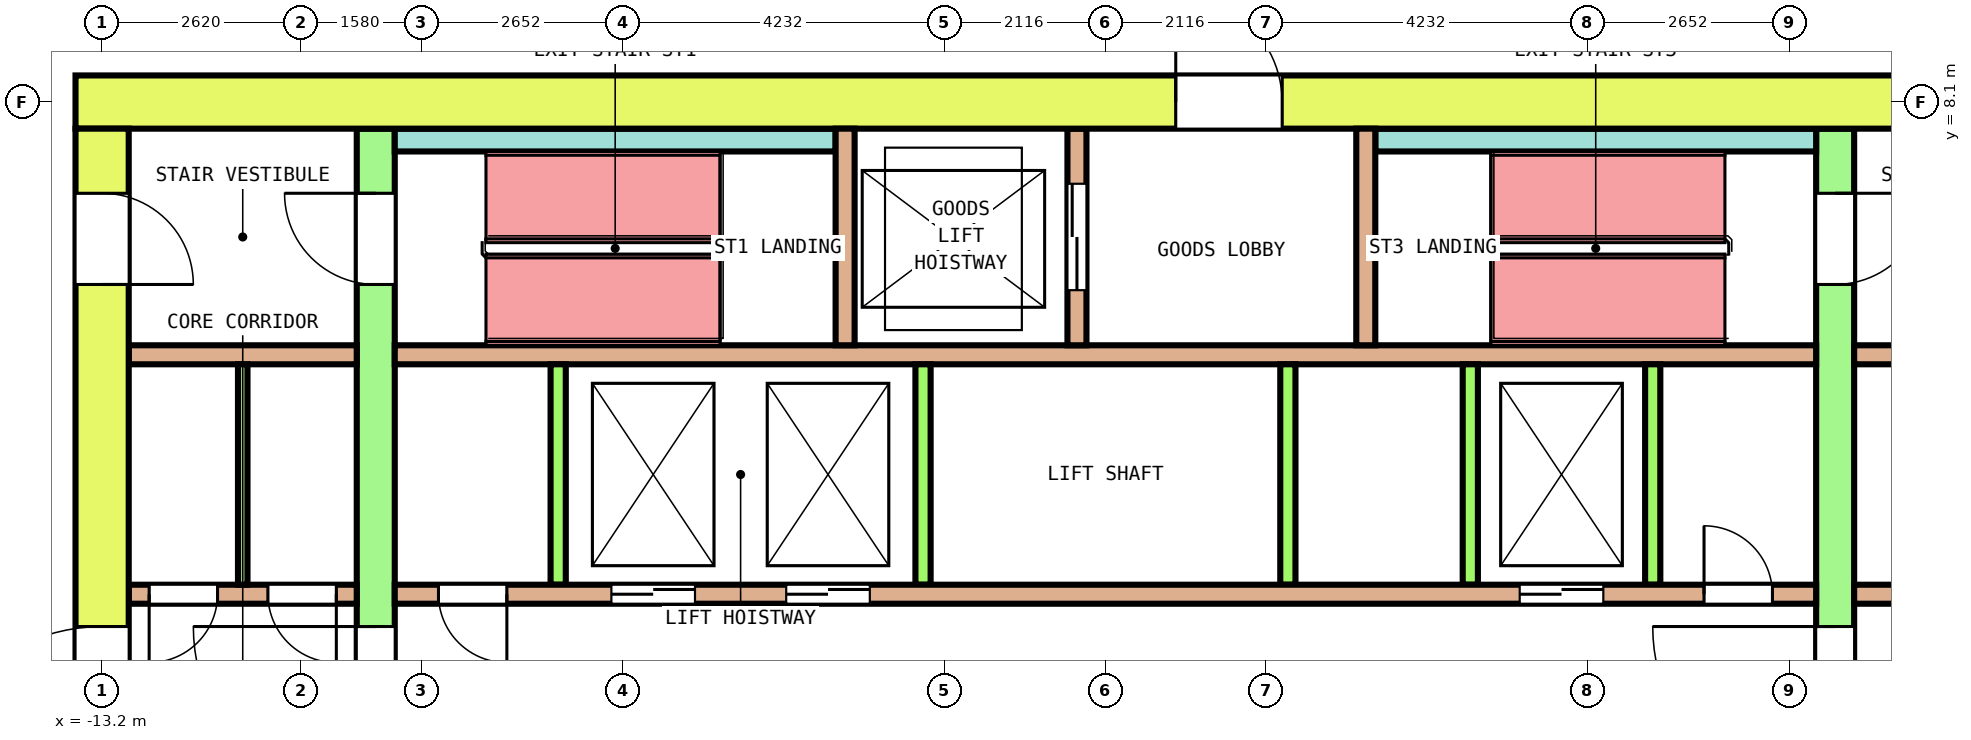
"""IFC4 building model, lengths in metres.
Left out: names, types, materials, properties, quantities, classifications, styles, units other than length and angle.
Written with IfcOpenShell. Run it as: python <this file> out.ifc"""

import sys

from ifc_helpers import new_model, si_unit, direction, frame, frame_2d, origin, place, context, subcontext, project, spatial, rectangle, extrude, element, fill, save


model = new_model("IFC4")
c1 = context("Model", 3, precision=1e-05, world=origin(), true_north=direction((0.0, 1.0)))
c2 = subcontext(c1, "Body", "Model", "MODEL_VIEW")
j1 = project(units=[si_unit("LENGTHUNIT", "METRE"), si_unit("PLANEANGLEUNIT", "RADIAN")], contexts=[c1])
p1 = place(None, origin())
s1 = spatial("IfcSite", under=j1, at=p1, CompositionType="ELEMENT")
p2 = place(p1, origin())
s2 = spatial("IfcBuilding", under=s1, at=p2, CompositionType="ELEMENT")
p3 = place(p2, frame((0.0, 0.0, 149.6)))
s3 = spatial("IfcBuildingStorey", under=s2, at=p3, CompositionType="ELEMENT", Elevation=149.6)
p4 = place(p3, frame((-13.55, 8.1, 0.0), z_axis=(0.0, 0.0, 1.0), x_axis=(1.0, 0.0, 0.0)))
e1 = element("IfcWall", 1, at=p4, inside=s3, PredefinedType="SHEAR", context=c2, shape_type="SweptSolid", body=[
    extrude(rectangle(XDim=27.1, YDim=0.7, at=frame_2d((13.55, 0.0))), origin(), (0.0, 0.0, 1.0), 4.1),
])
p5 = place(p4, frame((14.475, 0.0, 0.0)))
e2 = element("IfcOpeningElement", 2, at=p5, cuts=e1, PredefinedType="OPENING", context=c2, shape_type="SweptSolid", body=[
    extrude(rectangle(XDim=1.4, YDim=2.1, at=frame_2d((0.7, 1.05))), frame((0.0, 0.36, 0.0), z_axis=(0.0, -1.0, 0.0), x_axis=(1.0, 0.0, 0.0)), (0.0, 0.0, 1.0), 0.72),
])
p6 = place(p3, frame((-13.2, -7.75, 0.0), z_axis=(0.0, 0.0, 1.0), x_axis=(0.0, 1.0, 0.0)))
e3 = element("IfcWall", 3, at=p6, inside=s3, PredefinedType="SHEAR", context=c2, shape_type="SweptSolid", body=[
    extrude(rectangle(XDim=15.5, YDim=0.7, at=frame_2d((7.75, 0.0))), origin(), (0.0, 0.0, 1.0), 4.1),
])
p7 = place(p6, frame((6.55, 0.0, 0.0)))
e4 = element("IfcOpeningElement", 4, at=p7, cuts=e3, PredefinedType="OPENING", context=c2, shape_type="SweptSolid", body=[
    extrude(rectangle(XDim=2.4, YDim=2.1, at=frame_2d((1.2, 1.05))), frame((0.0, 0.36, 0.0), z_axis=(0.0, -1.0, 0.0), x_axis=(1.0, 0.0, 0.0)), (0.0, 0.0, 1.0), 0.72),
])
p8 = place(p6, frame((13.45, 0.0, 0.0)))
e5 = element("IfcOpeningElement", 5, at=p8, cuts=e3, PredefinedType="OPENING", context=c2, shape_type="SweptSolid", body=[
    extrude(rectangle(XDim=1.2, YDim=2.1, at=frame_2d((0.6, 1.05))), frame((0.0, 0.36, 0.0), z_axis=(0.0, -1.0, 0.0), x_axis=(1.0, 0.0, 0.0)), (0.0, 0.0, 1.0), 0.72),
])
p9 = place(p6, frame((0.85, 0.0, 0.0)))
e6 = element("IfcOpeningElement", 6, at=p9, cuts=e3, PredefinedType="OPENING", context=c2, shape_type="SweptSolid", body=[
    extrude(rectangle(XDim=1.2, YDim=2.1, at=frame_2d((0.6, 1.05))), frame((0.0, 0.36, 0.0), z_axis=(0.0, -1.0, 0.0), x_axis=(1.0, 0.0, 0.0)), (0.0, 0.0, 1.0), 0.72),
])
p10 = place(p3, frame((-9.6, -7.75, 0.0), z_axis=(0.0, 0.0, 1.0), x_axis=(0.0, 1.0, 0.0)))
e7 = element("IfcWall", 7, at=p10, inside=s3, PredefinedType="SHEAR", context=c2, shape_type="SweptSolid", body=[
    extrude(rectangle(XDim=15.5, YDim=0.5, at=frame_2d((7.75, 0.0))), origin(), (0.0, 0.0, 1.0), 4.1),
])
p11 = place(p10, frame((6.55, 0.0, 0.0)))
e8 = element("IfcOpeningElement", 8, at=p11, cuts=e7, PredefinedType="OPENING", context=c2, shape_type="SweptSolid", body=[
    extrude(rectangle(XDim=2.4, YDim=2.1, at=frame_2d((1.2, 1.05))), frame((0.0, 0.26, 0.0), z_axis=(0.0, -1.0, 0.0), x_axis=(1.0, 0.0, 0.0)), (0.0, 0.0, 1.0), 0.52),
])
p12 = place(p10, frame((13.45, 0.0, 0.0)))
e9 = element("IfcOpeningElement", 9, at=p12, cuts=e7, PredefinedType="OPENING", context=c2, shape_type="SweptSolid", body=[
    extrude(rectangle(XDim=1.2, YDim=2.1, at=frame_2d((0.6, 1.05))), frame((0.0, 0.26, 0.0), z_axis=(0.0, -1.0, 0.0), x_axis=(1.0, 0.0, 0.0)), (0.0, 0.0, 1.0), 0.52),
])
p13 = place(p10, frame((0.85, 0.0, 0.0)))
e10 = element("IfcOpeningElement", 10, at=p13, cuts=e7, PredefinedType="OPENING", context=c2, shape_type="SweptSolid", body=[
    extrude(rectangle(XDim=1.2, YDim=2.1, at=frame_2d((0.6, 1.05))), frame((0.0, 0.26, 0.0), z_axis=(0.0, -1.0, 0.0), x_axis=(1.0, 0.0, 0.0)), (0.0, 0.0, 1.0), 0.52),
])
p14 = place(p3, frame((9.6, -7.75, 0.0), z_axis=(0.0, 0.0, 1.0), x_axis=(0.0, 1.0, 0.0)))
e11 = element("IfcWall", 11, at=p14, inside=s3, PredefinedType="SHEAR", context=c2, shape_type="SweptSolid", body=[
    extrude(rectangle(XDim=15.5, YDim=0.5, at=frame_2d((7.75, 0.0))), origin(), (0.0, 0.0, 1.0), 4.1),
])
p15 = place(p14, frame((6.55, 0.0, 0.0)))
e12 = element("IfcOpeningElement", 12, at=p15, cuts=e11, PredefinedType="OPENING", context=c2, shape_type="SweptSolid", body=[
    extrude(rectangle(XDim=2.4, YDim=2.1, at=frame_2d((1.2, 1.05))), frame((0.0, 0.26, 0.0), z_axis=(0.0, -1.0, 0.0), x_axis=(1.0, 0.0, 0.0)), (0.0, 0.0, 1.0), 0.52),
])
p16 = place(p14, frame((13.45, 0.0, 0.0)))
e13 = element("IfcOpeningElement", 13, at=p16, cuts=e11, PredefinedType="OPENING", context=c2, shape_type="SweptSolid", body=[
    extrude(rectangle(XDim=1.2, YDim=2.1, at=frame_2d((0.6, 1.05))), frame((0.0, 0.26, 0.0), z_axis=(0.0, -1.0, 0.0), x_axis=(1.0, 0.0, 0.0)), (0.0, 0.0, 1.0), 0.52),
])
p17 = place(p14, frame((0.95, 0.0, 0.0)))
e14 = element("IfcOpeningElement", 14, at=p17, cuts=e11, PredefinedType="OPENING", context=c2, shape_type="SweptSolid", body=[
    extrude(rectangle(XDim=1.0, YDim=2.1, at=frame_2d((0.5, 1.05))), frame((0.0, 0.26, 0.0), z_axis=(0.0, -1.0, 0.0), x_axis=(1.0, 0.0, 0.0)), (0.0, 0.0, 1.0), 0.52),
])
p18 = place(p3, frame((-12.85, 1.625, 0.0), z_axis=(0.0, 0.0, 1.0), x_axis=(1.0, 0.0, 0.0)))
e15 = element("IfcWall", 15, at=p18, inside=s3, PredefinedType="SOLIDWALL", context=c2, shape_type="SweptSolid", body=[
    extrude(rectangle(XDim=3.0, YDim=0.25, at=frame_2d((1.5, 0.0))), origin(), (0.0, 0.0, 1.0), 4.1),
])
p19 = place(p18, frame((0.269, 0.0, 0.0)))
e16 = element("IfcOpeningElement", 16, at=p19, cuts=e15, PredefinedType="OPENING", context=c2, shape_type="SweptSolid", body=[
    extrude(rectangle(XDim=0.9, YDim=2.1, at=frame_2d((0.45, 1.05))), frame((0.0, 0.135, 0.0), z_axis=(0.0, -1.0, 0.0), x_axis=(1.0, 0.0, 0.0)), (0.0, 0.0, 1.0), 0.27),
])
p20 = place(p18, frame((1.831, 0.0, 0.0)))
e17 = element("IfcOpeningElement", 17, at=p20, cuts=e15, PredefinedType="OPENING", context=c2, shape_type="SweptSolid", body=[
    extrude(rectangle(XDim=0.9, YDim=2.1, at=frame_2d((0.45, 1.05))), frame((0.0, 0.135, 0.0), z_axis=(0.0, -1.0, 0.0), x_axis=(1.0, 0.0, 0.0)), (0.0, 0.0, 1.0), 0.27),
])
p21 = place(p3, frame((-9.35, 1.625, 0.0), z_axis=(0.0, 0.0, 1.0), x_axis=(1.0, 0.0, 0.0)))
e18 = element("IfcWall", 18, at=p21, inside=s3, PredefinedType="SOLIDWALL", context=c2, shape_type="SweptSolid", body=[
    extrude(rectangle(XDim=18.7, YDim=0.25, at=frame_2d((9.35, 0.0))), origin(), (0.0, 0.0, 1.0), 4.1),
])
p22 = place(p21, frame((2.85, 0.0, 0.0)))
e19 = element("IfcOpeningElement", 19, at=p22, cuts=e18, PredefinedType="OPENING", context=c2, shape_type="SweptSolid", body=[
    extrude(rectangle(XDim=1.1, YDim=2.1, at=frame_2d((0.55, 1.05))), frame((0.0, 0.135, 0.0), z_axis=(0.0, -1.0, 0.0), x_axis=(1.0, 0.0, 0.0)), (0.0, 0.0, 1.0), 0.27),
])
p23 = place(p21, frame((5.15, 0.0, 0.0)))
e20 = element("IfcOpeningElement", 20, at=p23, cuts=e18, PredefinedType="OPENING", context=c2, shape_type="SweptSolid", body=[
    extrude(rectangle(XDim=1.1, YDim=2.1, at=frame_2d((0.55, 1.05))), frame((0.0, 0.135, 0.0), z_axis=(0.0, -1.0, 0.0), x_axis=(1.0, 0.0, 0.0)), (0.0, 0.0, 1.0), 0.27),
])
p24 = place(p21, frame((14.8, 0.0, 0.0)))
e21 = element("IfcOpeningElement", 21, at=p24, cuts=e18, PredefinedType="OPENING", context=c2, shape_type="SweptSolid", body=[
    extrude(rectangle(XDim=1.1, YDim=2.1, at=frame_2d((0.55, 1.05))), frame((0.0, 0.135, 0.0), z_axis=(0.0, -1.0, 0.0), x_axis=(1.0, 0.0, 0.0)), (0.0, 0.0, 1.0), 0.27),
])
p25 = place(p21, frame((0.575, 0.0, 0.0)))
e22 = element("IfcOpeningElement", 22, at=p25, cuts=e18, PredefinedType="OPENING", context=c2, shape_type="SweptSolid", body=[
    extrude(rectangle(XDim=0.9, YDim=2.1, at=frame_2d((0.45, 1.05))), frame((0.0, 0.135, 0.0), z_axis=(0.0, -1.0, 0.0), x_axis=(1.0, 0.0, 0.0)), (0.0, 0.0, 1.0), 0.27),
])
p26 = place(p21, frame((17.225, 0.0, 0.0)))
e23 = element("IfcOpeningElement", 23, at=p26, cuts=e18, PredefinedType="OPENING", context=c2, shape_type="SweptSolid", body=[
    extrude(rectangle(XDim=0.9, YDim=2.1, at=frame_2d((0.45, 1.05))), frame((0.0, 0.135, 0.0), z_axis=(0.0, -1.0, 0.0), x_axis=(1.0, 0.0, 0.0)), (0.0, 0.0, 1.0), 0.27),
])
p27 = place(p3, frame((9.85, 1.625, 0.0), z_axis=(0.0, 0.0, 1.0), x_axis=(1.0, 0.0, 0.0)))
e24 = element("IfcWall", 24, at=p27, inside=s3, PredefinedType="SOLIDWALL", context=c2, shape_type="SweptSolid", body=[
    extrude(rectangle(XDim=3.0, YDim=0.25, at=frame_2d((1.5, 0.0))), origin(), (0.0, 0.0, 1.0), 4.1),
])
p28 = place(p27, frame((1.05, 0.0, 0.0)))
e25 = element("IfcOpeningElement", 25, at=p28, cuts=e24, PredefinedType="OPENING", context=c2, shape_type="SweptSolid", body=[
    extrude(rectangle(XDim=0.9, YDim=2.1, at=frame_2d((0.45, 1.05))), frame((0.0, 0.135, 0.0), z_axis=(0.0, -1.0, 0.0), x_axis=(1.0, 0.0, 0.0)), (0.0, 0.0, 1.0), 0.27),
])
p29 = place(p3, frame((-12.85, 4.775, 0.0), z_axis=(0.0, 0.0, 1.0), x_axis=(1.0, 0.0, 0.0)))
e26 = element("IfcWall", 26, at=p29, inside=s3, PredefinedType="SOLIDWALL", context=c2, shape_type="SweptSolid", body=[
    extrude(rectangle(XDim=3.0, YDim=0.25, at=frame_2d((1.5, 0.0))), origin(), (0.0, 0.0, 1.0), 4.1),
])
p30 = place(p3, frame((-9.35, 4.775, 0.0), z_axis=(0.0, 0.0, 1.0), x_axis=(1.0, 0.0, 0.0)))
e27 = element("IfcWall", 27, at=p30, inside=s3, PredefinedType="SOLIDWALL", context=c2, shape_type="SweptSolid", body=[
    extrude(rectangle(XDim=18.7, YDim=0.25, at=frame_2d((9.35, 0.0))), origin(), (0.0, 0.0, 1.0), 4.1),
])
p31 = place(p3, frame((9.85, 4.775, 0.0), z_axis=(0.0, 0.0, 1.0), x_axis=(1.0, 0.0, 0.0)))
e28 = element("IfcWall", 28, at=p31, inside=s3, PredefinedType="SOLIDWALL", context=c2, shape_type="SweptSolid", body=[
    extrude(rectangle(XDim=3.0, YDim=0.25, at=frame_2d((1.5, 0.0))), origin(), (0.0, 0.0, 1.0), 4.1),
])
for number, where, z_axis, x_axis in (
    (29, (-7.2, 1.75, 0.0), (0.0, 0.0, 1.0), (0.0, 1.0, 0.0)),
    (30, (-2.4, 1.75, 0.0), (0.0, 0.0, 1.0), (0.0, 1.0, 0.0)),
    (31, (2.4, 1.75, 0.0), (0.0, 0.0, 1.0), (0.0, 1.0, 0.0)),
    (32, (4.8, 1.75, 0.0), (0.0, 0.0, 1.0), (0.0, 1.0, 0.0)),
    (33, (7.2, 1.75, 0.0), (0.0, 0.0, 1.0), (0.0, 1.0, 0.0)),
):
    element("IfcWall", number, at=place(p3, frame(where, z_axis=z_axis, x_axis=x_axis)), inside=s3, PredefinedType="SOLIDWALL", context=c2, shape_type="SweptSolid", body=[
        extrude(rectangle(XDim=2.9, YDim=0.2, at=frame_2d((1.45, 0.0))), origin(), (0.0, 0.0, 1.0), 4.1),
    ])
for number, where, z_axis, x_axis in (
    (34, (-9.35, 7.6, 0.0), (0.0, 0.0, 1.0), (1.0, 0.0, 0.0)),
    (35, (3.55, 7.6, 0.0), (0.0, 0.0, 1.0), (1.0, 0.0, 0.0)),
):
    element("IfcWall", number, at=place(p3, frame(where, z_axis=z_axis, x_axis=x_axis)), inside=s3, PredefinedType="SOLIDWALL", context=c2, shape_type="SweptSolid", body=[
        extrude(rectangle(XDim=5.8, YDim=0.3, at=frame_2d((2.9, 0.0))), origin(), (0.0, 0.0, 1.0), 4.1),
    ])
p32 = place(p3, frame((-3.425, 4.9, 0.0), z_axis=(0.0, 0.0, 1.0), x_axis=(0.0, 1.0, 0.0)))
e36 = element("IfcWall", 36, at=p32, inside=s3, PredefinedType="SOLIDWALL", context=c2, shape_type="SweptSolid", body=[
    extrude(rectangle(XDim=2.85, YDim=0.25, at=frame_2d((1.425, 0.0))), origin(), (0.0, 0.0, 1.0), 4.1),
])
p33 = place(p3, frame((-0.375, 4.9, 0.0), z_axis=(0.0, 0.0, 1.0), x_axis=(0.0, 1.0, 0.0)))
e37 = element("IfcWall", 37, at=p33, inside=s3, PredefinedType="SOLIDWALL", context=c2, shape_type="SweptSolid", body=[
    extrude(rectangle(XDim=2.85, YDim=0.25, at=frame_2d((1.425, 0.0))), origin(), (0.0, 0.0, 1.0), 4.1),
])
p34 = place(p33, frame((0.725, 0.0, 0.0)))
e38 = element("IfcOpeningElement", 38, at=p34, cuts=e37, PredefinedType="OPENING", context=c2, shape_type="SweptSolid", body=[
    extrude(rectangle(XDim=1.4, YDim=2.1, at=frame_2d((0.7, 1.05))), frame((0.0, 0.135, 0.0), z_axis=(0.0, -1.0, 0.0), x_axis=(1.0, 0.0, 0.0)), (0.0, 0.0, 1.0), 0.27),
])
p35 = place(p3, frame((3.425, 4.9, 0.0), z_axis=(0.0, 0.0, 1.0), x_axis=(0.0, 1.0, 0.0)))
e39 = element("IfcWall", 39, at=p35, inside=s3, PredefinedType="SOLIDWALL", context=c2, shape_type="SweptSolid", body=[
    extrude(rectangle(XDim=2.85, YDim=0.25, at=frame_2d((1.425, 0.0))), origin(), (0.0, 0.0, 1.0), 4.1),
])
p36 = place(p3, frame((-11.35, 1.75, 0.0), z_axis=(0.0, 0.0, 1.0), x_axis=(0.0, 1.0, 0.0)))
e40 = element("IfcWall", 40, at=p36, inside=s3, PredefinedType="PARTITIONING", context=c2, shape_type="SweptSolid", body=[
    extrude(rectangle(XDim=2.9, YDim=0.125, at=frame_2d((1.45, 0.0))), origin(), (0.0, 0.0, 1.0), 4.1),
])
p37 = place(p22, origin())
e41 = element("IfcDoor", 41, at=p37, inside=s3, OperationType="DOUBLE_DOOR_SLIDING", PredefinedType="DOOR", context=c2, shape_type="SweptSolid", body=[
    extrude(rectangle(XDim=1.1, YDim=2.1, at=frame_2d((0.55, 1.05))), frame((0.0, 0.075, 0.0), z_axis=(0.0, -1.0, 0.0), x_axis=(1.0, 0.0, 0.0)), (0.0, 0.0, 1.0), 0.15),
])
fill(e19, e41)
p38 = place(p23, origin())
e42 = element("IfcDoor", 42, at=p38, inside=s3, OperationType="DOUBLE_DOOR_SLIDING", PredefinedType="DOOR", context=c2, shape_type="SweptSolid", body=[
    extrude(rectangle(XDim=1.1, YDim=2.1, at=frame_2d((0.55, 1.05))), frame((0.0, 0.075, 0.0), z_axis=(0.0, -1.0, 0.0), x_axis=(1.0, 0.0, 0.0)), (0.0, 0.0, 1.0), 0.15),
])
fill(e20, e42)
p39 = place(p24, origin())
e43 = element("IfcDoor", 43, at=p39, inside=s3, OperationType="DOUBLE_DOOR_SLIDING", PredefinedType="DOOR", context=c2, shape_type="SweptSolid", body=[
    extrude(rectangle(XDim=1.1, YDim=2.1, at=frame_2d((0.55, 1.05))), frame((0.0, 0.075, 0.0), z_axis=(0.0, -1.0, 0.0), x_axis=(1.0, 0.0, 0.0)), (0.0, 0.0, 1.0), 0.15),
])
fill(e21, e43)
p40 = place(p34, origin())
e44 = element("IfcDoor", 44, at=p40, inside=s3, OperationType="DOUBLE_DOOR_SLIDING", PredefinedType="DOOR", context=c2, shape_type="SweptSolid", body=[
    extrude(rectangle(XDim=1.4, YDim=2.1, at=frame_2d((0.7, 1.05))), frame((0.0, 0.075, 0.0), z_axis=(0.0, -1.0, 0.0), x_axis=(1.0, 0.0, 0.0)), (0.0, 0.0, 1.0), 0.15),
])
fill(e38, e44)
p41 = place(p11, origin())
e45 = element("IfcDoor", 45, at=p41, inside=s3, OperationType="DOUBLE_DOOR_SINGLE_SWING", PredefinedType="DOOR", context=c2, shape_type="SweptSolid", body=[
    extrude(rectangle(XDim=2.4, YDim=2.1, at=frame_2d((1.2, 1.05))), frame((0.0, 0.2, 0.0), z_axis=(0.0, -1.0, 0.0), x_axis=(1.0, 0.0, 0.0)), (0.0, 0.0, 1.0), 0.4),
])
fill(e8, e45)
p42 = place(p15, origin())
e46 = element("IfcDoor", 46, at=p42, inside=s3, OperationType="DOUBLE_DOOR_SINGLE_SWING", PredefinedType="DOOR", context=c2, shape_type="SweptSolid", body=[
    extrude(rectangle(XDim=2.4, YDim=2.1, at=frame_2d((1.2, 1.05))), frame((0.0, 0.2, 0.0), z_axis=(0.0, -1.0, 0.0), x_axis=(1.0, 0.0, 0.0)), (0.0, 0.0, 1.0), 0.4),
])
fill(e12, e46)
p43 = place(p7, origin())
e47 = element("IfcDoor", 47, at=p43, inside=s3, OperationType="DOUBLE_DOOR_SINGLE_SWING", PredefinedType="DOOR", context=c2, shape_type="SweptSolid", body=[
    extrude(rectangle(XDim=2.4, YDim=2.1, at=frame_2d((1.2, 1.05))), frame((0.0, 0.3, 0.0), z_axis=(0.0, -1.0, 0.0), x_axis=(1.0, 0.0, 0.0)), (0.0, 0.0, 1.0), 0.6),
])
fill(e4, e47)
p44 = place(p12, origin())
e48 = element("IfcDoor", 48, at=p44, inside=s3, OperationType="SINGLE_SWING_LEFT", PredefinedType="DOOR", context=c2, shape_type="SweptSolid", body=[
    extrude(rectangle(XDim=1.2, YDim=2.1, at=frame_2d((0.6, 1.05))), frame((0.0, 0.2, 0.0), z_axis=(0.0, -1.0, 0.0), x_axis=(1.0, 0.0, 0.0)), (0.0, 0.0, 1.0), 0.4),
])
fill(e9, e48)
p45 = place(p8, origin())
e49 = element("IfcDoor", 49, at=p45, inside=s3, OperationType="SINGLE_SWING_RIGHT", PredefinedType="DOOR", context=c2, shape_type="SweptSolid", body=[
    extrude(rectangle(XDim=1.2, YDim=2.1, at=frame_2d((0.6, 1.05))), frame((0.0, 0.3, 0.0), z_axis=(0.0, -1.0, 0.0), x_axis=(1.0, 0.0, 0.0)), (0.0, 0.0, 1.0), 0.6),
])
fill(e5, e49)
p46 = place(p16, origin())
e50 = element("IfcDoor", 50, at=p46, inside=s3, OperationType="SINGLE_SWING_LEFT", PredefinedType="DOOR", context=c2, shape_type="SweptSolid", body=[
    extrude(rectangle(XDim=1.2, YDim=2.1, at=frame_2d((0.6, 1.05))), frame((0.0, 0.2, 0.0), z_axis=(0.0, -1.0, 0.0), x_axis=(1.0, 0.0, 0.0)), (0.0, 0.0, 1.0), 0.4),
])
fill(e13, e50)
p47 = place(p5, origin())
e51 = element("IfcDoor", 51, at=p47, inside=s3, OperationType="DOUBLE_DOOR_SINGLE_SWING", PredefinedType="DOOR", context=c2, shape_type="SweptSolid", body=[
    extrude(rectangle(XDim=1.4, YDim=2.1, at=frame_2d((0.7, 1.05))), frame((0.0, 0.3, 0.0), z_axis=(0.0, -1.0, 0.0), x_axis=(1.0, 0.0, 0.0)), (0.0, 0.0, 1.0), 0.6),
])
fill(e2, e51)
p48 = place(p19, origin())
e52 = element("IfcDoor", 52, at=p48, inside=s3, OperationType="SINGLE_SWING_RIGHT", PredefinedType="DOOR", context=c2, shape_type="SweptSolid", body=[
    extrude(rectangle(XDim=0.9, YDim=2.1, at=frame_2d((0.45, 1.05))), frame((0.0, 0.075, 0.0), z_axis=(0.0, -1.0, 0.0), x_axis=(1.0, 0.0, 0.0)), (0.0, 0.0, 1.0), 0.15),
])
fill(e16, e52)
p49 = place(p20, origin())
e53 = element("IfcDoor", 53, at=p49, inside=s3, OperationType="SINGLE_SWING_LEFT", PredefinedType="DOOR", context=c2, shape_type="SweptSolid", body=[
    extrude(rectangle(XDim=0.9, YDim=2.1, at=frame_2d((0.45, 1.05))), frame((0.0, 0.075, 0.0), z_axis=(0.0, -1.0, 0.0), x_axis=(1.0, 0.0, 0.0)), (0.0, 0.0, 1.0), 0.15),
])
fill(e17, e53)
p50 = place(p25, origin())
e54 = element("IfcDoor", 54, at=p50, inside=s3, OperationType="SINGLE_SWING_RIGHT", PredefinedType="DOOR", context=c2, shape_type="SweptSolid", body=[
    extrude(rectangle(XDim=0.9, YDim=2.1, at=frame_2d((0.45, 1.05))), frame((0.0, 0.075, 0.0), z_axis=(0.0, -1.0, 0.0), x_axis=(1.0, 0.0, 0.0)), (0.0, 0.0, 1.0), 0.15),
])
fill(e22, e54)
p51 = place(p26, origin())
e55 = element("IfcDoor", 55, at=p51, inside=s3, OperationType="SINGLE_SWING_LEFT", PredefinedType="DOOR", context=c2, shape_type="SweptSolid", body=[
    extrude(rectangle(XDim=0.9, YDim=2.1, at=frame_2d((0.45, 1.05))), frame((0.0, 0.075, 0.0), z_axis=(0.0, -1.0, 0.0), x_axis=(1.0, 0.0, 0.0)), (0.0, 0.0, 1.0), 0.15),
])
fill(e23, e55)
save(model, sys.argv[1])
